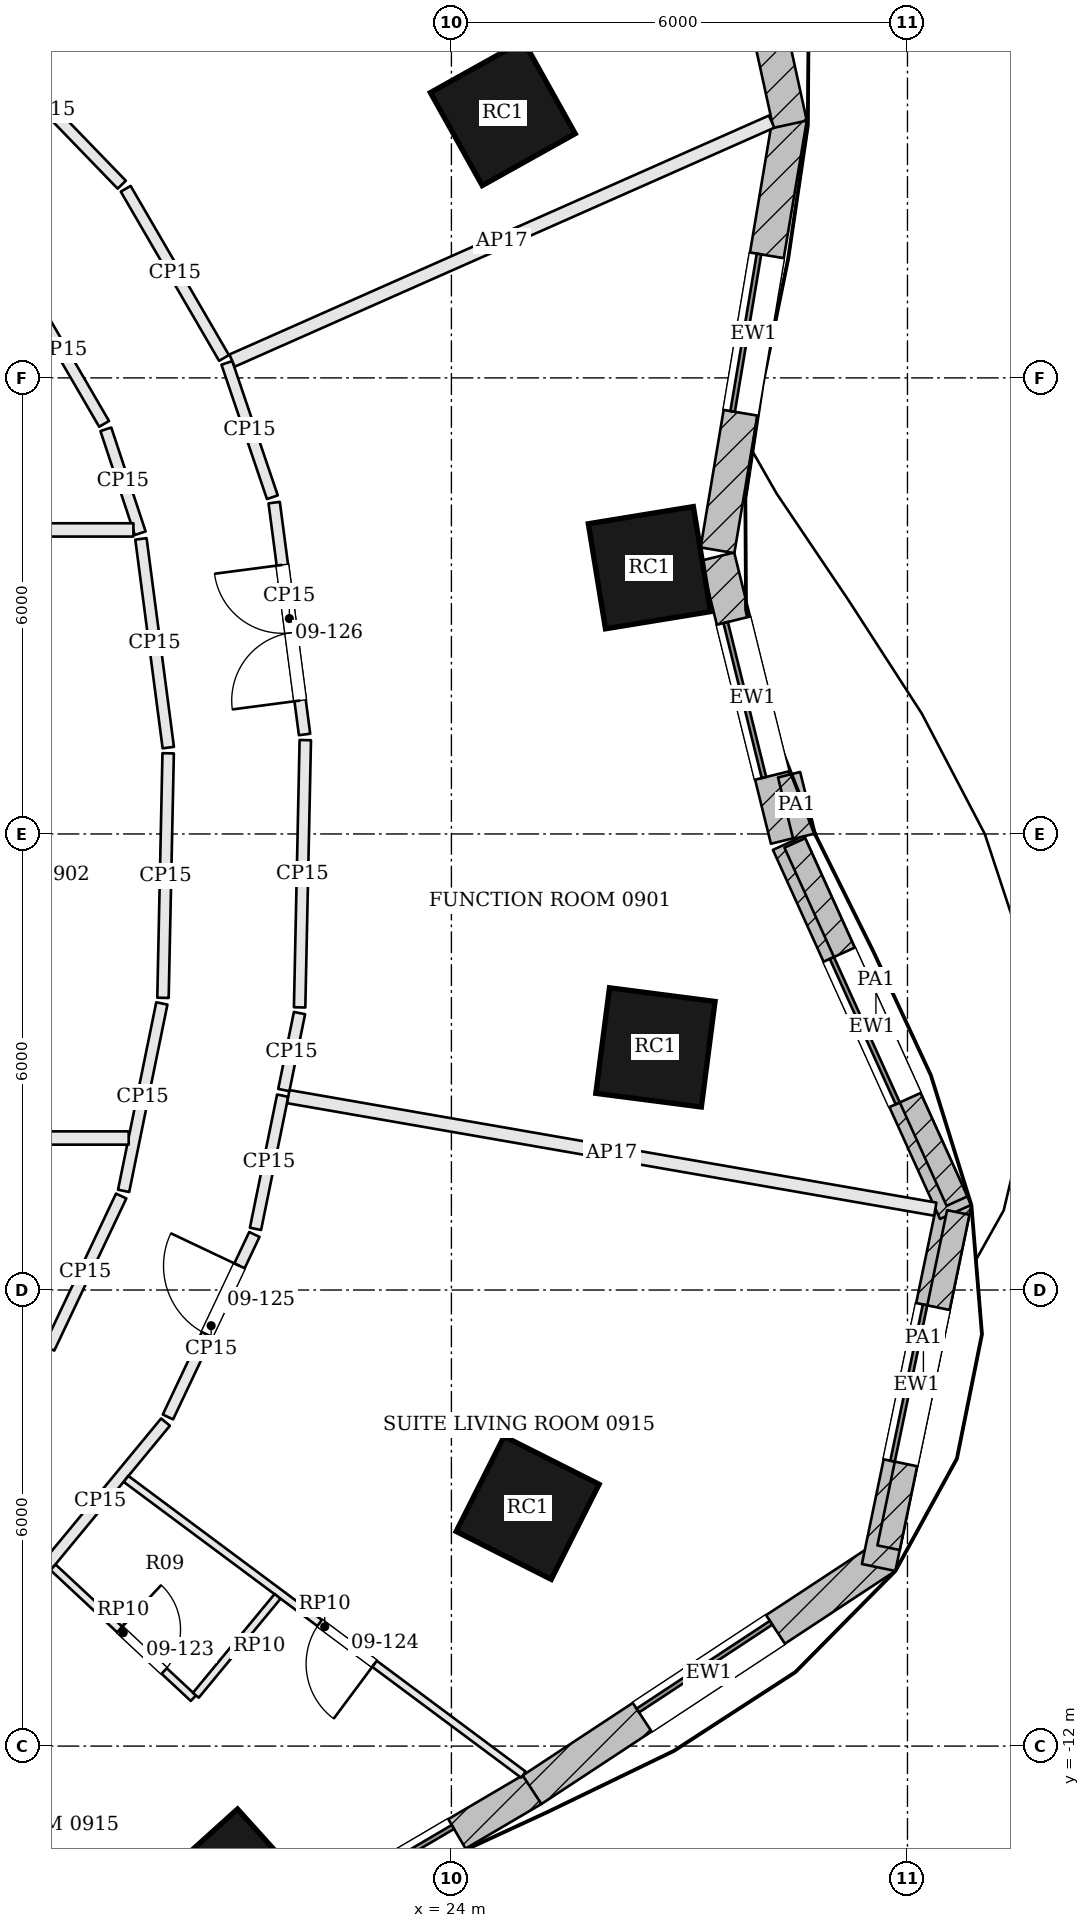
"""IFC4 building model, lengths in metres.
Left out: names, types, materials, properties, quantities, classifications, styles, units other than length and angle.
Written with IfcOpenShell. Run it as: python <this file> out.ifc"""

import sys

from ifc_helpers import new_model, si_unit, direction, frame, frame_2d, origin, origin_2d, place, context, subcontext, project, spatial, rectangle, extrude, element, fill, save


model = new_model("IFC4")
c1 = context("Model", 3, precision=1e-05, world=origin(), true_north=direction((0.0, 1.0)))
c2 = subcontext(c1, "Body", "Model", "MODEL_VIEW")
j1 = project(units=[si_unit("LENGTHUNIT", "METRE"), si_unit("PLANEANGLEUNIT", "RADIAN")], contexts=[c1])
p1 = place(None, origin())
s1 = spatial("IfcSite", under=j1, at=p1, CompositionType="ELEMENT")
p2 = place(p1, origin())
s2 = spatial("IfcBuilding", under=s1, at=p2, CompositionType="ELEMENT")
p3 = place(p2, frame((0.0, 0.0, 48.3)))
s3 = spatial("IfcBuildingStorey", under=s2, at=p3, CompositionType="ELEMENT", Elevation=48.3)
for number, where, z_axis, x_axis in (
    (1, (26.605, 3.503, 0.0), (0.0, 0.0, 1.0), (-0.161, 0.987, 0.0)),
    (2, (24.676, 9.483, 0.0), (0.0, 0.0, 1.0), (-0.487, 0.873, 0.0)),
    (3, (21.135, -13.817, 0.0), (0.0, 0.0, 1.0), (0.743, 0.67, 0.0)),
    (4, (25.003, -8.866, 0.0), (0.0, 0.0, 1.0), (0.45, 0.893, 0.0)),
    (5, (26.684, -2.808, 0.0), (0.0, 0.0, 1.0), (0.128, 0.992, 0.0)),
):
    element("IfcColumn", number, at=place(p3, frame(where, z_axis=z_axis, x_axis=x_axis)), inside=s3, PredefinedType="COLUMN", context=c2, shape_type="SweptSolid", body=[
        extrude(rectangle(XDim=1.4, YDim=1.4, at=origin_2d()), origin(), (0.0, 0.0, 1.0), 3.6),
    ])
p4 = place(p3, frame((28.422, -0.075, 0.0), z_axis=(0.0, 0.0, 1.0), x_axis=(-0.239809222807, 0.970820033094, 0.0)))
e6 = element("IfcWall", 6, at=p4, inside=s3, PredefinedType="SOLIDWALL", context=c2, shape_type="SweptSolid", body=[
    extrude(rectangle(XDim=3.836, YDim=0.45, at=frame_2d((1.918, 0.0))), origin(), (0.0, 0.0, 1.0), 3.4),
])
p5 = place(p4, frame((0.868, 0.0, 0.9)))
e7 = element("IfcOpeningElement", 7, at=p5, cuts=e6, PredefinedType="OPENING", context=c2, shape_type="SweptSolid", body=[
    extrude(rectangle(XDim=2.1, YDim=2.0, at=frame_2d((1.05, 1.0))), frame((0.0, 0.235, 0.0), z_axis=(0.0, -1.0, 0.0), x_axis=(1.0, 0.0, 0.0)), (0.0, 0.0, 1.0), 0.47),
])
p6 = place(p3, frame((27.5, 3.732, 0.0), z_axis=(0.0, 0.0, 1.0), x_axis=(0.165174419367, 0.986264371853, 0.0)))
e8 = element("IfcWall", 8, at=p6, inside=s3, PredefinedType="SOLIDWALL", context=c2, shape_type="SweptSolid", body=[
    extrude(rectangle(XDim=5.769, YDim=0.45, at=frame_2d((2.885, 0.0))), origin(), (0.0, 0.0, 1.0), 3.4),
])
p7 = place(p6, frame((1.834, 0.0, 0.9)))
e9 = element("IfcOpeningElement", 9, at=p7, cuts=e8, PredefinedType="OPENING", context=c2, shape_type="SweptSolid", body=[
    extrude(rectangle(XDim=2.1, YDim=2.0, at=frame_2d((1.05, 1.0))), frame((0.0, 0.235, 0.0), z_axis=(0.0, -1.0, 0.0), x_axis=(1.0, 0.0, 0.0)), (0.0, 0.0, 1.0), 0.47),
])
p8 = place(p3, frame((28.456, 9.337, 0.0), z_axis=(0.0, 0.0, 1.0), x_axis=(-0.213878425795, 0.976860286315, 0.0)))
e10 = element("IfcWall", 10, at=p8, inside=s3, PredefinedType="SOLIDWALL", context=c2, shape_type="SweptSolid", body=[
    extrude(rectangle(XDim=4.812, YDim=0.45, at=frame_2d((2.406, 0.0))), origin(), (0.0, 0.0, 1.0), 3.4),
])
p9 = place(p8, frame((1.356, 0.0, 0.9)))
e11 = element("IfcOpeningElement", 11, at=p9, cuts=e10, PredefinedType="OPENING", context=c2, shape_type="SweptSolid", body=[
    extrude(rectangle(XDim=2.1, YDim=2.0, at=frame_2d((1.05, 1.0))), frame((0.0, 0.235, 0.0), z_axis=(0.0, -1.0, 0.0), x_axis=(1.0, 0.0, 0.0)), (0.0, 0.0, 1.0), 0.47),
])
p10 = place(p3, frame((21.266, -14.805, 0.0), z_axis=(0.0, 0.0, 1.0), x_axis=(0.861975457737, 0.506950007653, 0.0)))
e12 = element("IfcWall", 12, at=p10, inside=s3, PredefinedType="SOLIDWALL", context=c2, shape_type="SweptSolid", body=[
    extrude(rectangle(XDim=4.413, YDim=0.45, at=frame_2d((2.207, 0.0))), origin(), (0.0, 0.0, 1.0), 3.4),
])
p11 = place(p10, frame((1.156, 0.0, 0.9)))
e13 = element("IfcOpeningElement", 13, at=p11, cuts=e12, PredefinedType="OPENING", context=c2, shape_type="SweptSolid", body=[
    extrude(rectangle(XDim=2.1, YDim=2.0, at=frame_2d((1.05, 1.0))), frame((0.0, 0.235, 0.0), z_axis=(0.0, -1.0, 0.0), x_axis=(1.0, 0.0, 0.0)), (0.0, 0.0, 1.0), 0.47),
])
p12 = place(p3, frame((25.061, -12.574, 0.0), z_axis=(0.0, 0.0, 1.0), x_axis=(0.83520622102, 0.549936876714, 0.0)))
e14 = element("IfcWall", 14, at=p12, inside=s3, PredefinedType="SOLIDWALL", context=c2, shape_type="SweptSolid", body=[
    extrude(rectangle(XDim=5.57, YDim=0.45, at=frame_2d((2.785, 0.0))), origin(), (0.0, 0.0, 1.0), 3.4),
])
p13 = place(p12, frame((1.735, 0.0, 0.9)))
e15 = element("IfcOpeningElement", 15, at=p13, cuts=e14, PredefinedType="OPENING", context=c2, shape_type="SweptSolid", body=[
    extrude(rectangle(XDim=2.1, YDim=2.0, at=frame_2d((1.05, 1.0))), frame((0.0, 0.235, 0.0), z_axis=(0.0, -1.0, 0.0), x_axis=(1.0, 0.0, 0.0)), (0.0, 0.0, 1.0), 0.47),
])
p14 = place(p3, frame((29.621, -9.65, 0.0), z_axis=(0.0, 0.0, 1.0), x_axis=(0.203505836306, 0.979073732969, 0.0)))
e16 = element("IfcWall", 16, at=p14, inside=s3, PredefinedType="SOLIDWALL", context=c2, shape_type="SweptSolid", body=[
    extrude(rectangle(XDim=4.914, YDim=0.45, at=frame_2d((2.457, 0.0))), origin(), (0.0, 0.0, 1.0), 3.4),
])
p15 = place(p14, frame((1.407, 0.0, 0.9)))
e17 = element("IfcOpeningElement", 17, at=p15, cuts=e16, PredefinedType="OPENING", context=c2, shape_type="SweptSolid", body=[
    extrude(rectangle(XDim=2.1, YDim=2.0, at=frame_2d((1.05, 1.0))), frame((0.0, 0.235, 0.0), z_axis=(0.0, -1.0, 0.0), x_axis=(1.0, 0.0, 0.0)), (0.0, 0.0, 1.0), 0.47),
])
p16 = place(p3, frame((30.634, -4.972, 0.0), z_axis=(0.0, 0.0, 1.0), x_axis=(-0.412494644758, 0.910960025493, 0.0)))
e18 = element("IfcWall", 18, at=p16, inside=s3, PredefinedType="SOLIDWALL", context=c2, shape_type="SweptSolid", body=[
    extrude(rectangle(XDim=5.33, YDim=0.45, at=frame_2d((2.665, 0.0))), origin(), (0.0, 0.0, 1.0), 3.4),
])
p17 = place(p16, frame((1.615, 0.0, 0.9)))
e19 = element("IfcOpeningElement", 19, at=p17, cuts=e18, PredefinedType="OPENING", context=c2, shape_type="SweptSolid", body=[
    extrude(rectangle(XDim=2.1, YDim=2.0, at=frame_2d((1.05, 1.0))), frame((0.0, 0.235, 0.0), z_axis=(0.0, -1.0, 0.0), x_axis=(1.0, 0.0, 0.0)), (0.0, 0.0, 1.0), 0.47),
])
p18 = place(p3, frame((28.642, -0.029, 3.6), z_axis=(0.0, 0.0, 1.0), x_axis=(-0.239775825721, 0.970828282138, 0.0)))
e20 = element("IfcWall", 20, at=p18, inside=s3, PredefinedType="PARAPET", context=c2, shape_type="SweptSolid", body=[
    extrude(rectangle(XDim=0.833, YDim=0.3, at=frame_2d((0.417, 0.0))), origin(), (0.0, 0.0, 1.0), 1.1),
])
p19 = place(p3, frame((29.751, -9.39, 3.6), z_axis=(0.0, 0.0, 1.0), x_axis=(0.203510555438, 0.97907275206, 0.0)))
e21 = element("IfcWall", 21, at=p19, inside=s3, PredefinedType="PARAPET", context=c2, shape_type="SweptSolid", body=[
    extrude(rectangle(XDim=4.505, YDim=0.3, at=frame_2d((2.252, 0.0))), origin(), (0.0, 0.0, 1.0), 1.1),
])
p20 = place(p3, frame((30.652, -4.83, 3.6), z_axis=(0.0, 0.0, 1.0), x_axis=(-0.412522333553, 0.910947487136, 0.0)))
e22 = element("IfcWall", 22, at=p20, inside=s3, PredefinedType="PARAPET", context=c2, shape_type="SweptSolid", body=[
    extrude(rectangle(XDim=5.173, YDim=0.3, at=frame_2d((2.586, 0.0))), origin(), (0.0, 0.0, 1.0), 1.1),
])
p21 = place(p3, frame((18.525, -9.813, 0.0), z_axis=(0.0, 0.0, 1.0), x_axis=(0.636590727548, 0.771201818981, 0.0)))
e23 = element("IfcWall", 23, at=p21, inside=s3, PredefinedType="PARTITIONING", context=c2, shape_type="SweptSolid", body=[
    extrude(rectangle(XDim=2.691, YDim=0.15, at=frame_2d((1.346, 0.0))), origin(), (0.0, 0.0, 1.0), 2.68),
])
p22 = place(p3, frame((20.271, -7.67, 0.0), z_axis=(0.0, 0.0, 1.0), x_axis=(0.427995478521, 0.903780875193, 0.0)))
e24 = element("IfcWall", 24, at=p22, inside=s3, PredefinedType="PARTITIONING", context=c2, shape_type="SweptSolid", body=[
    extrude(rectangle(XDim=2.656, YDim=0.15, at=frame_2d((1.328, 0.0))), origin(), (0.0, 0.0, 1.0), 2.68),
])
p23 = place(p22, frame((1.2, 0.0, 0.0)))
e25 = element("IfcOpeningElement", 25, at=p23, cuts=e24, PredefinedType="OPENING", context=c2, shape_type="SweptSolid", body=[
    extrude(rectangle(XDim=1.0, YDim=2.1, at=frame_2d((0.5, 1.05))), frame((0.0, 0.085, 0.0), z_axis=(0.0, -1.0, 0.0), x_axis=(1.0, 0.0, 0.0)), (0.0, 0.0, 1.0), 0.17),
])
p24 = place(p3, frame((21.423, -5.195, 0.0), z_axis=(0.0, 0.0, 1.0), x_axis=(0.199711278169, 0.979854787901, 0.0)))
e26 = element("IfcWall", 26, at=p24, inside=s3, PredefinedType="PARTITIONING", context=c2, shape_type="SweptSolid", body=[
    extrude(rectangle(XDim=1.789, YDim=0.15, at=frame_2d((0.894, 0.0))), origin(), (0.0, 0.0, 1.0), 2.68),
])
p25 = place(p3, frame((30.366, -4.936, 0.0), z_axis=(0.0, 0.0, 1.0), x_axis=(-0.98521403611, 0.171328056817, 0.0)))
e27 = element("IfcWall", 27, at=p25, inside=s3, PredefinedType="PARTITIONING", context=c2, shape_type="SweptSolid", body=[
    extrude(rectangle(XDim=8.64, YDim=0.175, at=frame_2d((4.32, 0.0))), origin(), (0.0, 0.0, 1.0), 2.68),
])
p26 = place(p3, frame((21.795, -3.369, 0.0), z_axis=(0.0, 0.0, 1.0), x_axis=(0.199793439504, 0.979838038418, 0.0)))
e28 = element("IfcWall", 28, at=p26, inside=s3, PredefinedType="PARTITIONING", context=c2, shape_type="SweptSolid", body=[
    extrude(rectangle(XDim=1.034, YDim=0.15, at=frame_2d((0.517, 0.0))), origin(), (0.0, 0.0, 1.0), 2.68),
])
p27 = place(p3, frame((22.003, -2.281, 0.0), z_axis=(0.0, 0.0, 1.0), x_axis=(0.021172866829, 0.999775829729, 0.0)))
e29 = element("IfcWall", 29, at=p27, inside=s3, PredefinedType="PARTITIONING", context=c2, shape_type="SweptSolid", body=[
    extrude(rectangle(XDim=3.517, YDim=0.15, at=frame_2d((1.758, 0.0))), origin(), (0.0, 0.0, 1.0), 2.68),
])
p28 = place(p3, frame((22.068, 1.309, 0.0), z_axis=(0.0, 0.0, 1.0), x_axis=(-0.129922755307, 0.991524118543, 0.0)))
e30 = element("IfcWall", 30, at=p28, inside=s3, PredefinedType="PARTITIONING", context=c2, shape_type="SweptSolid", body=[
    extrude(rectangle(XDim=3.076, YDim=0.15, at=frame_2d((1.538, 0.0))), origin(), (0.0, 0.0, 1.0), 2.68),
])
p29 = place(p28, frame((0.45, 0.0, 0.0)))
e31 = element("IfcOpeningElement", 31, at=p29, cuts=e30, PredefinedType="OPENING", context=c2, shape_type="SweptSolid", body=[
    extrude(rectangle(XDim=1.8, YDim=2.1, at=frame_2d((0.9, 1.05))), frame((0.0, 0.085, 0.0), z_axis=(0.0, -1.0, 0.0), x_axis=(1.0, 0.0, 0.0)), (0.0, 0.0, 1.0), 0.17),
])
p30 = place(p3, frame((21.644, 4.43, 0.0), z_axis=(0.0, 0.0, 1.0), x_axis=(-0.320738869387, 0.9471676608, 0.0)))
e32 = element("IfcWall", 32, at=p30, inside=s3, PredefinedType="PARTITIONING", context=c2, shape_type="SweptSolid", body=[
    extrude(rectangle(XDim=1.866, YDim=0.15, at=frame_2d((0.933, 0.0))), origin(), (0.0, 0.0, 1.0), 2.68),
])
p31 = place(p3, frame((28.213, 9.371, 0.0), z_axis=(0.0, 0.0, 1.0), x_axis=(-0.914345064768, -0.404935923986, 0.0)))
e33 = element("IfcWall", 33, at=p31, inside=s3, PredefinedType="PARTITIONING", context=c2, shape_type="SweptSolid", body=[
    extrude(rectangle(XDim=7.763, YDim=0.175, at=frame_2d((3.882, 0.0))), origin(), (0.0, 0.0, 1.0), 2.68),
])
p32 = place(p3, frame((21.008, 6.262, 0.0), z_axis=(0.0, 0.0, 1.0), x_axis=(-0.502366583903, 0.864654737671, 0.0)))
e34 = element("IfcWall", 34, at=p32, inside=s3, PredefinedType="PARTITIONING", context=c2, shape_type="SweptSolid", body=[
    extrude(rectangle(XDim=2.574, YDim=0.15, at=frame_2d((1.287, 0.0))), origin(), (0.0, 0.0, 1.0), 2.68),
])
p33 = place(p3, frame((19.663, 8.542, 0.0), z_axis=(0.0, 0.0, 1.0), x_axis=(-0.695225869021, 0.718791340407, 0.0)))
e35 = element("IfcWall", 35, at=p33, inside=s3, PredefinedType="PARTITIONING", context=c2, shape_type="SweptSolid", body=[
    extrude(rectangle(XDim=2.745, YDim=0.15, at=frame_2d((1.373, 0.0))), origin(), (0.0, 0.0, 1.0), 2.68),
])
p34 = place(p3, frame((18.306, 7.329, 0.0), z_axis=(0.0, 0.0, 1.0), x_axis=(0.502425081691, -0.864620747662, 0.0)))
e36 = element("IfcWall", 36, at=p34, inside=s3, PredefinedType="PARTITIONING", context=c2, shape_type="SweptSolid", body=[
    extrude(rectangle(XDim=2.237, YDim=0.15, at=frame_2d((1.119, 0.0))), origin(), (0.0, 0.0, 1.0), 2.68),
])
p35 = place(p3, frame((19.454, 5.324, 0.0), z_axis=(0.0, 0.0, 1.0), x_axis=(0.313632756375, -0.949544361327, 0.0)))
e37 = element("IfcWall", 37, at=p35, inside=s3, PredefinedType="PARTITIONING", context=c2, shape_type="SweptSolid", body=[
    extrude(rectangle(XDim=1.44, YDim=0.15, at=frame_2d((0.72, 0.0))), origin(), (0.0, 0.0, 1.0), 2.68),
])
p36 = place(p3, frame((19.915, 3.882, 0.0), z_axis=(0.0, 0.0, 1.0), x_axis=(0.129945947446, -0.991521079323, 0.0)))
e38 = element("IfcWall", 38, at=p36, inside=s3, PredefinedType="PARTITIONING", context=c2, shape_type="SweptSolid", body=[
    extrude(rectangle(XDim=2.769, YDim=0.15, at=frame_2d((1.385, 0.0))), origin(), (0.0, 0.0, 1.0), 2.68),
])
p37 = place(p3, frame((20.273, 1.061, 0.0), z_axis=(0.0, 0.0, 1.0), x_axis=(-0.021166906337, -0.99977595594, 0.0)))
e39 = element("IfcWall", 39, at=p37, inside=s3, PredefinedType="PARTITIONING", context=c2, shape_type="SweptSolid", body=[
    extrude(rectangle(XDim=3.218, YDim=0.15, at=frame_2d((1.609, 0.0))), origin(), (0.0, 0.0, 1.0), 2.68),
])
p38 = place(p3, frame((20.19, -2.229, 0.0), z_axis=(0.0, 0.0, 1.0), x_axis=(-0.199752828647, -0.97984631828, 0.0)))
e40 = element("IfcWall", 40, at=p38, inside=s3, PredefinedType="PARTITIONING", context=c2, shape_type="SweptSolid", body=[
    extrude(rectangle(XDim=2.517, YDim=0.15, at=frame_2d((1.258, 0.0))), origin(), (0.0, 0.0, 1.0), 2.68),
])
p39 = place(p3, frame((19.655, -4.763, 0.0), z_axis=(0.0, 0.0, 1.0), x_axis=(-0.427972604023, -0.903791707312, 0.0)))
e41 = element("IfcWall", 41, at=p39, inside=s3, PredefinedType="PARTITIONING", context=c2, shape_type="SweptSolid", body=[
    extrude(rectangle(XDim=2.215, YDim=0.15, at=frame_2d((1.107, 0.0))), origin(), (0.0, 0.0, 1.0), 2.68),
])
p40 = place(p3, frame((24.946, -12.375, 0.0), z_axis=(0.0, 0.0, 1.0), x_axis=(-0.802211102923, 0.597040489705, 0.0)))
e42 = element("IfcWall", 42, at=p40, inside=s3, PredefinedType="PARTITIONING", context=c2, shape_type="SweptSolid", body=[
    extrude(rectangle(XDim=6.516, YDim=0.1, at=frame_2d((3.258, 0.0))), origin(), (0.0, 0.0, 1.0), 2.934),
])
p41 = place(p40, frame((2.441, 0.0, 0.0)))
e43 = element("IfcOpeningElement", 43, at=p41, cuts=e42, PredefinedType="OPENING", context=c2, shape_type="SweptSolid", body=[
    extrude(rectangle(XDim=0.9, YDim=2.4, at=frame_2d((0.45, 1.2))), frame((0.0, 0.06, 0.0), z_axis=(0.0, -1.0, 0.0), x_axis=(1.0, 0.0, 0.0)), (0.0, 0.0, 1.0), 0.12),
])
p42 = place(p3, frame((18.759, -9.648, 0.0), z_axis=(0.0, 0.0, 1.0), x_axis=(0.731331715945, -0.682021936049, 0.0)))
e44 = element("IfcWall", 44, at=p42, inside=s3, PredefinedType="PARTITIONING", context=c2, shape_type="SweptSolid", body=[
    extrude(rectangle(XDim=2.525, YDim=0.1, at=frame_2d((1.263, 0.0))), origin(), (0.0, 0.0, 1.0), 2.934),
])
p43 = place(p42, frame((1.2, 0.0, 0.0)))
e45 = element("IfcOpeningElement", 45, at=p43, cuts=e44, PredefinedType="OPENING", context=c2, shape_type="SweptSolid", body=[
    extrude(rectangle(XDim=0.8, YDim=2.1, at=frame_2d((0.4, 1.05))), frame((0.0, 0.06, 0.0), z_axis=(0.0, -1.0, 0.0), x_axis=(1.0, 0.0, 0.0)), (0.0, 0.0, 1.0), 0.12),
])
p44 = place(p3, frame((20.637, -11.331, 0.0), z_axis=(0.0, 0.0, 1.0), x_axis=(0.637105732439, 0.770776417447, 0.0)))
e46 = element("IfcWall", 46, at=p44, inside=s3, PredefinedType="PARTITIONING", context=c2, shape_type="SweptSolid", body=[
    extrude(rectangle(XDim=1.688, YDim=0.1, at=frame_2d((0.844, 0.0))), origin(), (0.0, 0.0, 1.0), 2.934),
])
p45 = place(p3, frame((14.875, 4.0, 0.0), z_axis=(0.0, 0.0, 1.0), x_axis=(1.0, 0.0, 0.0)))
e47 = element("IfcWall", 47, at=p45, inside=s3, PredefinedType="PARTITIONING", context=c2, shape_type="SweptSolid", body=[
    extrude(rectangle(XDim=4.941, YDim=0.175, at=frame_2d((2.471, 0.0))), origin(), (0.0, 0.0, 1.0), 2.68),
])
p46 = place(p3, frame((14.875, -4.0, 0.0), z_axis=(0.0, 0.0, 1.0), x_axis=(1.0, 0.0, 0.0)))
e48 = element("IfcWall", 48, at=p46, inside=s3, PredefinedType="PARTITIONING", context=c2, shape_type="SweptSolid", body=[
    extrude(rectangle(XDim=4.879, YDim=0.175, at=frame_2d((2.439, 0.0))), origin(), (0.0, 0.0, 1.0), 2.68),
])
p47 = place(p5, origin())
e49 = element("IfcWindow", 49, at=p47, inside=s3, PartitioningType="SINGLE_PANEL", PredefinedType="WINDOW", context=c2, shape_type="SweptSolid", body=[
    extrude(rectangle(XDim=2.1, YDim=2.0, at=frame_2d((1.05, 1.0))), frame((0.0, 0.135, 0.0), z_axis=(0.0, -1.0, 0.0), x_axis=(1.0, 0.0, 0.0)), (0.0, 0.0, 1.0), 0.06),
])
fill(e7, e49)
p48 = place(p7, origin())
e50 = element("IfcWindow", 50, at=p48, inside=s3, PartitioningType="SINGLE_PANEL", PredefinedType="WINDOW", context=c2, shape_type="SweptSolid", body=[
    extrude(rectangle(XDim=2.1, YDim=2.0, at=frame_2d((1.05, 1.0))), frame((0.0, 0.135, 0.0), z_axis=(0.0, -1.0, 0.0), x_axis=(1.0, 0.0, 0.0)), (0.0, 0.0, 1.0), 0.06),
])
fill(e9, e50)
p49 = place(p11, origin())
e51 = element("IfcWindow", 51, at=p49, inside=s3, PartitioningType="SINGLE_PANEL", PredefinedType="WINDOW", context=c2, shape_type="SweptSolid", body=[
    extrude(rectangle(XDim=2.1, YDim=2.0, at=frame_2d((1.05, 1.0))), frame((0.0, 0.135, 0.0), z_axis=(0.0, -1.0, 0.0), x_axis=(1.0, 0.0, 0.0)), (0.0, 0.0, 1.0), 0.06),
])
fill(e13, e51)
p50 = place(p13, origin())
e52 = element("IfcWindow", 52, at=p50, inside=s3, PartitioningType="SINGLE_PANEL", PredefinedType="WINDOW", context=c2, shape_type="SweptSolid", body=[
    extrude(rectangle(XDim=2.1, YDim=2.0, at=frame_2d((1.05, 1.0))), frame((0.0, 0.135, 0.0), z_axis=(0.0, -1.0, 0.0), x_axis=(1.0, 0.0, 0.0)), (0.0, 0.0, 1.0), 0.06),
])
fill(e15, e52)
p51 = place(p15, origin())
e53 = element("IfcWindow", 53, at=p51, inside=s3, PartitioningType="SINGLE_PANEL", PredefinedType="WINDOW", context=c2, shape_type="SweptSolid", body=[
    extrude(rectangle(XDim=2.1, YDim=2.0, at=frame_2d((1.05, 1.0))), frame((0.0, 0.135, 0.0), z_axis=(0.0, -1.0, 0.0), x_axis=(1.0, 0.0, 0.0)), (0.0, 0.0, 1.0), 0.06),
])
fill(e17, e53)
p52 = place(p17, origin())
e54 = element("IfcWindow", 54, at=p52, inside=s3, PartitioningType="SINGLE_PANEL", PredefinedType="WINDOW", context=c2, shape_type="SweptSolid", body=[
    extrude(rectangle(XDim=2.1, YDim=2.0, at=frame_2d((1.05, 1.0))), frame((0.0, 0.135, 0.0), z_axis=(0.0, -1.0, 0.0), x_axis=(1.0, 0.0, 0.0)), (0.0, 0.0, 1.0), 0.06),
])
fill(e19, e54)
p53 = place(p43, origin())
e55 = element("IfcDoor", 55, at=p53, inside=s3, OperationType="SINGLE_SWING_LEFT", PredefinedType="DOOR", context=c2, shape_type="SweptSolid", body=[
    extrude(rectangle(XDim=0.8, YDim=2.1, at=frame_2d((0.4, 1.05))), frame((0.0, 0.025, 0.0), z_axis=(0.0, -1.0, 0.0), x_axis=(1.0, 0.0, 0.0)), (0.0, 0.0, 1.0), 0.05),
])
fill(e45, e55)
p54 = place(p41, origin())
e56 = element("IfcDoor", 56, at=p54, inside=s3, OperationType="SINGLE_SWING_LEFT", PredefinedType="DOOR", context=c2, shape_type="SweptSolid", body=[
    extrude(rectangle(XDim=0.9, YDim=2.4, at=frame_2d((0.45, 1.2))), frame((0.0, 0.025, 0.0), z_axis=(0.0, -1.0, 0.0), x_axis=(1.0, 0.0, 0.0)), (0.0, 0.0, 1.0), 0.05),
])
fill(e43, e56)
p55 = place(p23, origin())
e57 = element("IfcDoor", 57, at=p55, inside=s3, OperationType="SINGLE_SWING_RIGHT", PredefinedType="DOOR", context=c2, shape_type="SweptSolid", body=[
    extrude(rectangle(XDim=1.0, YDim=2.1, at=frame_2d((0.5, 1.05))), frame((0.0, 0.025, 0.0), z_axis=(0.0, -1.0, 0.0), x_axis=(1.0, 0.0, 0.0)), (0.0, 0.0, 1.0), 0.05),
])
fill(e25, e57)
p56 = place(p29, origin())
e58 = element("IfcDoor", 58, at=p56, inside=s3, OperationType="DOUBLE_DOOR_SINGLE_SWING", PredefinedType="DOOR", context=c2, shape_type="SweptSolid", body=[
    extrude(rectangle(XDim=1.8, YDim=2.1, at=frame_2d((0.9, 1.05))), frame((0.0, 0.025, 0.0), z_axis=(0.0, -1.0, 0.0), x_axis=(1.0, 0.0, 0.0)), (0.0, 0.0, 1.0), 0.05),
])
fill(e31, e58)
save(model, sys.argv[1])
